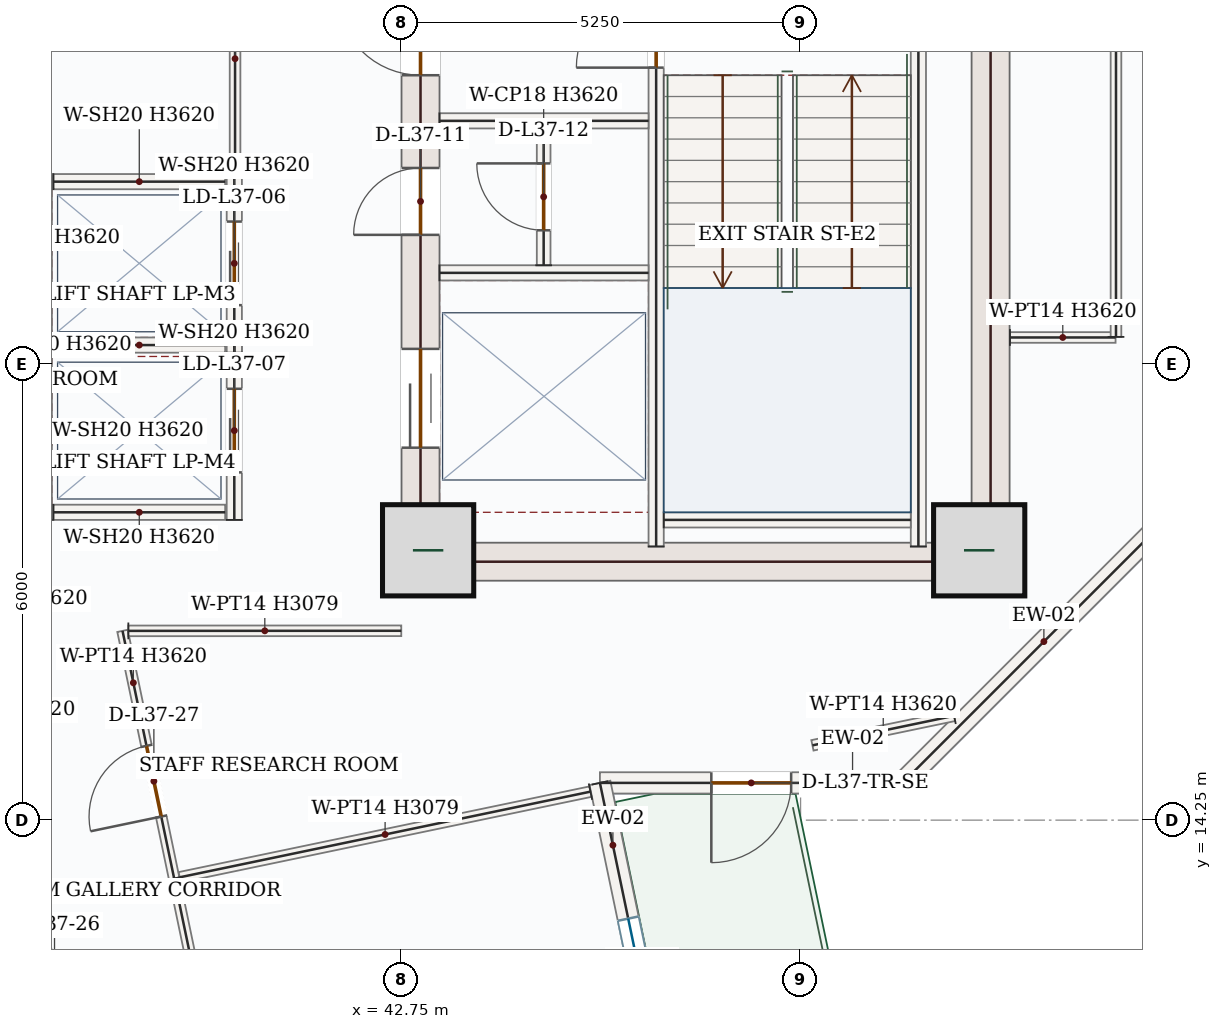
"""IFC4 building model, lengths in metres.
Left out: names, types, materials, properties, quantities, classifications, styles, units other than length and angle.
Written with IfcOpenShell. Run it as: python <this file> out.ifc"""

import sys

from ifc_helpers import new_model, si_unit, direction, frame, frame_2d, origin, origin_2d, place, context, subcontext, project, spatial, rectangle, extrude, source, transform, mapped, element, fill, save


model = new_model("IFC4")
c1 = context("Model", 3, precision=1e-05, world=origin(), true_north=direction((0.0, 1.0)))
c2 = subcontext(c1, "Body", "Model", "MODEL_VIEW")
j1 = project(units=[si_unit("LENGTHUNIT", "METRE"), si_unit("PLANEANGLEUNIT", "RADIAN")], contexts=[c1])
p1 = place(None, origin())
s1 = spatial("IfcSite", under=j1, at=p1, CompositionType="ELEMENT")
p2 = place(p1, origin())
s2 = spatial("IfcBuilding", under=s1, at=p2, CompositionType="ELEMENT")
p3 = place(p2, frame((0.0, 0.0, 162.9)))
s3 = spatial("IfcBuildingStorey", under=s2, at=p3, CompositionType="ELEMENT", Elevation=162.9)
p4 = place(p3, frame((43.0, 17.4, 0.0), z_axis=(0.0, 0.0, 1.0), x_axis=(0.0, 1.0, 0.0)))
e1 = element("IfcWall", 1, at=p4, inside=s3, PredefinedType="SHEAR", context=c2, shape_type="SweptSolid", body=[
    extrude(rectangle(XDim=8.55, YDim=0.5, at=frame_2d((4.275, 0.0))), origin(), (0.0, 0.0, 1.0), 3.62),
])
p5 = place(p4, frame((6.65, 0.0, 0.0)))
e2 = element("IfcOpeningElement", 2, at=p5, cuts=e1, PredefinedType="OPENING", context=c2, shape_type="SweptSolid", body=[
    extrude(rectangle(XDim=1.1, YDim=2.2, at=frame_2d((0.55, 1.1))), frame((0.0, 0.26, 0.0), z_axis=(0.0, -1.0, 0.0), x_axis=(1.0, 0.0, 0.0)), (0.0, 0.0, 1.0), 0.52),
])
p6 = place(p4, frame((1.75, 0.0, 0.0)))
e3 = element("IfcOpeningElement", 3, at=p6, cuts=e1, PredefinedType="OPENING", context=c2, shape_type="SweptSolid", body=[
    extrude(rectangle(XDim=1.3, YDim=2.2, at=frame_2d((0.65, 1.1))), frame((0.0, 0.26, 0.0), z_axis=(0.0, -1.0, 0.0), x_axis=(1.0, 0.0, 0.0)), (0.0, 0.0, 1.0), 0.52),
])
p7 = place(p4, frame((4.55, 0.0, 0.0)))
e4 = element("IfcOpeningElement", 4, at=p7, cuts=e1, PredefinedType="OPENING", context=c2, shape_type="SweptSolid", body=[
    extrude(rectangle(XDim=0.88, YDim=2.1, at=frame_2d((0.44, 1.05))), frame((0.0, 0.26, 0.0), z_axis=(0.0, -1.0, 0.0), x_axis=(1.0, 0.0, 0.0)), (0.0, 0.0, 1.0), 0.52),
])
m1 = source(origin(), c2, "Body", "SweptSolid", [
    extrude(rectangle(XDim=8.55, YDim=0.5, at=frame_2d((4.275, 0.0))), origin(), (0.0, 0.0, 1.0), 3.62),
])
p8 = place(p3, frame((50.5, 17.4, 0.0), z_axis=(0.0, 0.0, 1.0), x_axis=(0.0, 1.0, 0.0)))
e5 = element("IfcWall", 5, at=p8, inside=s3, PredefinedType="SHEAR", context=c2, shape_type="MappedRepresentation", body=[
    mapped(m1, transform((0.0, 0.0, 0.0), x_axis=(1.0, 0.0, 0.0), y_axis=(0.0, 1.0, 0.0), z_axis=(0.0, 0.0, 1.0), scale=1.0)),
])
m2 = source(origin(), c2, "Body", "SweptSolid", [
    extrude(rectangle(XDim=7.0, YDim=0.5, at=frame_2d((3.5, 0.0))), origin(), (0.0, 0.0, 1.0), 3.62),
])
p9 = place(p3, frame((43.25, 17.65, 0.0), z_axis=(0.0, 0.0, 1.0), x_axis=(1.0, 0.0, 0.0)))
e6 = element("IfcWall", 6, at=p9, inside=s3, PredefinedType="SHEAR", context=c2, shape_type="MappedRepresentation", body=[
    mapped(m2, transform((0.0, 0.0, 0.0), x_axis=(1.0, 0.0, 0.0), y_axis=(0.0, 1.0, 0.0), z_axis=(0.0, 0.0, 1.0), scale=1.0)),
])
m3 = source(origin(), c2, "Body", "SweptSolid", [
    extrude(rectangle(XDim=1.2, YDim=1.2, at=origin_2d()), origin(), (0.0, 0.0, 1.0), 3.9),
])
for number, where, z_axis, x_axis in (
    (7, (43.1, 17.8, 0.0), (0.0, 0.0, 1.0), (1.0, 0.0, 0.0)),
    (8, (50.35, 17.8, 0.0), (0.0, 0.0, 1.0), (1.0, 0.0, 0.0)),
):
    element("IfcColumn", number, at=place(p3, frame(where, z_axis=z_axis, x_axis=x_axis)), inside=s3, PredefinedType="COLUMN", context=c2, shape_type="MappedRepresentation", body=[
        mapped(m3, transform((0.0, 0.0, 0.0), x_axis=(1.0, 0.0, 0.0), y_axis=(0.0, 1.0, 0.0), z_axis=(0.0, 0.0, 1.0), scale=1.0)),
    ])
m4 = source(origin(), c2, "Body", "SweptSolid", [
    extrude(rectangle(XDim=5.258, YDim=0.28, at=frame_2d((2.629, 0.0))), origin(), (0.0, 0.0, 1.0), 3.62),
])
p10 = place(p3, frame((53.06, 18.458, 0.0), z_axis=(0.0, 0.0, 1.0), x_axis=(-0.707106781187, -0.707106781187, 0.0)))
e9 = element("IfcWall", 9, at=p10, inside=s3, PredefinedType="SOLIDWALL", context=c2, shape_type="MappedRepresentation", body=[
    mapped(m4, transform((0.0, 0.0, 0.0), x_axis=(1.0, 0.0, 0.0), y_axis=(0.0, 1.0, 0.0), z_axis=(0.0, 0.0, 1.0), scale=1.0)),
])
p11 = place(p3, frame((49.342, 14.74, 0.0), z_axis=(0.0, 0.0, 1.0), x_axis=(-1.0, 0.0, 0.0)))
e10 = element("IfcWall", 10, at=p11, inside=s3, PredefinedType="SOLIDWALL", context=c2, shape_type="SweptSolid", body=[
    extrude(rectangle(XDim=3.982, YDim=0.28, at=frame_2d((1.991, 0.0))), origin(), (0.0, 0.0, 1.0), 3.62),
])
p12 = place(p11, frame((1.466, 0.0, 0.0)))
e11 = element("IfcOpeningElement", 11, at=p12, cuts=e10, PredefinedType="OPENING", context=c2, shape_type="SweptSolid", body=[
    extrude(rectangle(XDim=1.05, YDim=2.15, at=frame_2d((0.525, 1.075))), frame((0.0, 0.15, 0.0), z_axis=(0.0, -1.0, 0.0), x_axis=(1.0, 0.0, 0.0)), (0.0, 0.0, 1.0), 0.3),
])
p13 = place(p3, frame((45.36, 14.74, 0.0), z_axis=(0.0, 0.0, 1.0), x_axis=(0.204151126022, -0.978939384101, 0.0)))
e12 = element("IfcWall", 12, at=p13, inside=s3, PredefinedType="SOLIDWALL", context=c2, shape_type="SweptSolid", body=[
    extrude(rectangle(XDim=5.447, YDim=0.28, at=frame_2d((2.724, 0.0))), origin(), (0.0, 0.0, 1.0), 3.62),
])
p14 = place(p13, frame((1.824, 0.0, 0.85)))
e13 = element("IfcOpeningElement", 13, at=p14, cuts=e12, PredefinedType="OPENING", context=c2, shape_type="SweptSolid", body=[
    extrude(rectangle(XDim=1.8, YDim=1.75, at=frame_2d((0.9, 0.875))), frame((0.0, 0.15, 0.0), z_axis=(0.0, -1.0, 0.0), x_axis=(1.0, 0.0, 0.0)), (0.0, 0.0, 1.0), 0.3),
])
m5 = source(origin(), c2, "Body", "SweptSolid", [
    extrude(rectangle(XDim=7.87, YDim=0.2, at=frame_2d((3.935, 0.0))), origin(), (0.0, 0.0, 1.0), 3.62),
])
p15 = place(p3, frame((49.55, 17.85, 0.0), z_axis=(0.0, 0.0, 1.0), x_axis=(0.0, 1.0, 0.0)))
e14 = element("IfcWall", 14, at=p15, inside=s3, PredefinedType="SOLIDWALL", context=c2, shape_type="MappedRepresentation", body=[
    mapped(m5, transform((0.0, 0.0, 0.0), x_axis=(1.0, 0.0, 0.0), y_axis=(0.0, 1.0, 0.0), z_axis=(0.0, 0.0, 1.0), scale=1.0)),
])
p16 = place(p3, frame((46.1, 17.85, 0.0), z_axis=(0.0, 0.0, 1.0), x_axis=(0.0, 1.0, 0.0)))
e15 = element("IfcWall", 15, at=p16, inside=s3, PredefinedType="SOLIDWALL", context=c2, shape_type="SweptSolid", body=[
    extrude(rectangle(XDim=8.0, YDim=0.2, at=frame_2d((4.0, 0.0))), origin(), (0.0, 0.0, 1.0), 3.62),
])
p17 = place(p16, frame((6.3, 0.0, 0.0)))
e16 = element("IfcOpeningElement", 16, at=p17, cuts=e15, PredefinedType="OPENING", context=c2, shape_type="SweptSolid", body=[
    extrude(rectangle(XDim=1.05, YDim=2.15, at=frame_2d((0.525, 1.075))), frame((0.0, 0.11, 0.0), z_axis=(0.0, -1.0, 0.0), x_axis=(1.0, 0.0, 0.0)), (0.0, 0.0, 1.0), 0.22),
])
m6 = source(origin(), c2, "Body", "SweptSolid", [
    extrude(rectangle(XDim=3.25, YDim=0.2, at=frame_2d((1.625, 0.0))), origin(), (0.0, 0.0, 1.0), 3.62),
])
p18 = place(p3, frame((46.2, 18.2, 0.0), z_axis=(0.0, 0.0, 1.0), x_axis=(1.0, 0.0, 0.0)))
e17 = element("IfcWall", 17, at=p18, inside=s3, PredefinedType="SOLIDWALL", context=c2, shape_type="MappedRepresentation", body=[
    mapped(m6, transform((0.0, 0.0, 0.0), x_axis=(1.0, 0.0, 0.0), y_axis=(0.0, 1.0, 0.0), z_axis=(0.0, 0.0, 1.0), scale=1.0)),
])
m7 = source(origin(), c2, "Body", "SweptSolid", [
    extrude(rectangle(XDim=2.75, YDim=0.2, at=frame_2d((1.375, 0.0))), origin(), (0.0, 0.0, 1.0), 3.62),
])
for number, where, z_axis, x_axis in (
    (18, (43.25, 23.45, 0.0), (0.0, 0.0, 1.0), (1.0, 0.0, 0.0)),
    (19, (43.25, 21.45, 0.0), (0.0, 0.0, 1.0), (1.0, 0.0, 0.0)),
):
    element("IfcWall", number, at=place(p3, frame(where, z_axis=z_axis, x_axis=x_axis)), inside=s3, PredefinedType="SOLIDWALL", context=c2, shape_type="MappedRepresentation", body=[
        mapped(m7, transform((0.0, 0.0, 0.0), x_axis=(1.0, 0.0, 0.0), y_axis=(0.0, 1.0, 0.0), z_axis=(0.0, 0.0, 1.0), scale=1.0)),
    ])
p19 = place(p3, frame((44.62, 21.55, 0.0), z_axis=(0.0, 0.0, 1.0), x_axis=(0.0, 1.0, 0.0)))
e20 = element("IfcWall", 20, at=p19, inside=s3, PredefinedType="PARTITIONING", context=c2, shape_type="SweptSolid", body=[
    extrude(rectangle(XDim=1.8, YDim=0.18, at=frame_2d((0.9, 0.0))), origin(), (0.0, 0.0, 1.0), 3.62),
])
p20 = place(p19, frame((0.46, 0.0, 0.0)))
e21 = element("IfcOpeningElement", 21, at=p20, cuts=e20, PredefinedType="OPENING", context=c2, shape_type="SweptSolid", body=[
    extrude(rectangle(XDim=0.88, YDim=2.1, at=frame_2d((0.44, 1.05))), frame((0.0, 0.1, 0.0), z_axis=(0.0, -1.0, 0.0), x_axis=(1.0, 0.0, 0.0)), (0.0, 0.0, 1.0), 0.2),
])
p21 = place(p3, frame((40.55, 20.4, 0.0), z_axis=(0.0, 0.0, 1.0), x_axis=(0.0, 1.0, 0.0)))
e22 = element("IfcWall", 22, at=p21, inside=s3, PredefinedType="SOLIDWALL", context=c2, shape_type="SweptSolid", body=[
    extrude(rectangle(XDim=2.35, YDim=0.2, at=frame_2d((1.175, 0.0))), origin(), (0.0, 0.0, 1.0), 3.62),
])
p22 = place(p21, frame((0.625, 0.0, 0.0)))
e23 = element("IfcOpeningElement", 23, at=p22, cuts=e22, PredefinedType="OPENING", context=c2, shape_type="SweptSolid", body=[
    extrude(rectangle(XDim=1.1, YDim=2.15, at=frame_2d((0.55, 1.075))), frame((0.0, 0.11, 0.0), z_axis=(0.0, -1.0, 0.0), x_axis=(1.0, 0.0, 0.0)), (0.0, 0.0, 1.0), 0.22),
])
m8 = source(origin(), c2, "Body", "SweptSolid", [
    extrude(rectangle(XDim=2.26, YDim=0.2, at=frame_2d((1.13, 0.0))), origin(), (0.0, 0.0, 1.0), 3.62),
])
for number, where, z_axis, x_axis in (
    (24, (38.17, 20.5, 0.0), (0.0, 0.0, 1.0), (1.0, 0.0, 0.0)),
    (25, (38.17, 22.65, 0.0), (0.0, 0.0, 1.0), (1.0, 0.0, 0.0)),
):
    element("IfcWall", number, at=place(p3, frame(where, z_axis=z_axis, x_axis=x_axis)), inside=s3, PredefinedType="SOLIDWALL", context=c2, shape_type="MappedRepresentation", body=[
        mapped(m8, transform((0.0, 0.0, 0.0), x_axis=(1.0, 0.0, 0.0), y_axis=(0.0, 1.0, 0.0), z_axis=(0.0, 0.0, 1.0), scale=1.0)),
    ])
p23 = place(p3, frame((40.55, 18.2, 0.0), z_axis=(0.0, 0.0, 1.0), x_axis=(0.0, 1.0, 0.0)))
e26 = element("IfcWall", 26, at=p23, inside=s3, PredefinedType="SOLIDWALL", context=c2, shape_type="SweptSolid", body=[
    extrude(rectangle(XDim=2.35, YDim=0.2, at=frame_2d((1.175, 0.0))), origin(), (0.0, 0.0, 1.0), 3.62),
])
p24 = place(p23, frame((0.625, 0.0, 0.0)))
e27 = element("IfcOpeningElement", 27, at=p24, cuts=e26, PredefinedType="OPENING", context=c2, shape_type="SweptSolid", body=[
    extrude(rectangle(XDim=1.1, YDim=2.15, at=frame_2d((0.55, 1.075))), frame((0.0, 0.11, 0.0), z_axis=(0.0, -1.0, 0.0), x_axis=(1.0, 0.0, 0.0)), (0.0, 0.0, 1.0), 0.22),
])
p25 = place(p3, frame((38.17, 18.3, 0.0), z_axis=(0.0, 0.0, 1.0), x_axis=(1.0, 0.0, 0.0)))
e28 = element("IfcWall", 28, at=p25, inside=s3, PredefinedType="SOLIDWALL", context=c2, shape_type="MappedRepresentation", body=[
    mapped(m8, transform((0.0, 0.0, 0.0), x_axis=(1.0, 0.0, 0.0), y_axis=(0.0, 1.0, 0.0), z_axis=(0.0, 0.0, 1.0), scale=1.0)),
])
m9 = source(origin(), c2, "Body", "SweptSolid", [
    extrude(rectangle(XDim=3.035, YDim=0.14, at=frame_2d((1.518, 0.0))), origin(), (0.0, 0.0, 1.0), 3.62),
])
p26 = place(p3, frame((40.56, 25.785, 0.0), z_axis=(0.0, 0.0, 1.0), x_axis=(0.0, -1.0, 0.0)))
e29 = element("IfcWall", 29, at=p26, inside=s3, PredefinedType="PARTITIONING", context=c2, shape_type="MappedRepresentation", body=[
    mapped(m9, transform((0.0, 0.0, 0.0), x_axis=(1.0, 0.0, 0.0), y_axis=(0.0, 1.0, 0.0), z_axis=(0.0, 0.0, 1.0), scale=1.0)),
])
p27 = place(p3, frame((39.759, 13.483, 0.0), z_axis=(0.0, 0.0, 1.0), x_axis=(-0.204124193585, 0.97894500029, 0.0)))
e30 = element("IfcWall", 30, at=p27, inside=s3, PredefinedType="PARTITIONING", context=c2, shape_type="SweptSolid", body=[
    extrude(rectangle(XDim=3.327, YDim=0.14, at=frame_2d((1.664, 0.0))), origin(), (0.0, 0.0, 1.0), 3.62),
])
p28 = place(p27, frame((0.832, 0.0, 0.0)))
e31 = element("IfcOpeningElement", 31, at=p28, cuts=e30, PredefinedType="OPENING", context=c2, shape_type="SweptSolid", body=[
    extrude(rectangle(XDim=0.95, YDim=2.15, at=frame_2d((0.475, 1.075))), frame((0.0, 0.08, 0.0), z_axis=(0.0, -1.0, 0.0), x_axis=(1.0, 0.0, 0.0)), (0.0, 0.0, 1.0), 0.16),
])
m10 = source(origin(), c2, "Body", "SweptSolid", [
    extrude(rectangle(XDim=3.591, YDim=0.14, at=frame_2d((1.795, 0.0))), origin(), (0.0, 0.0, 1.0), 3.079),
])
p29 = place(p3, frame((39.156, 16.74, 0.0), z_axis=(0.0, 0.0, 1.0), x_axis=(0.999999942209, 0.000339974142, 0.0)))
e32 = element("IfcWall", 32, at=p29, inside=s3, PredefinedType="PARTITIONING", context=c2, shape_type="MappedRepresentation", body=[
    mapped(m10, transform((0.0, 0.0, 0.0), x_axis=(1.0, 0.0, 0.0), y_axis=(0.0, 1.0, 0.0), z_axis=(0.0, 0.0, 1.0), scale=1.0)),
])
m11 = source(origin(), c2, "Body", "SweptSolid", [
    extrude(rectangle(XDim=1.903, YDim=0.14, at=frame_2d((0.952, 0.0))), origin(), (0.0, 0.0, 1.0), 3.62),
])
p30 = place(p3, frame((50.019, 15.623, 0.0), z_axis=(0.0, 0.0, 1.0), x_axis=(-0.978929167673, -0.204200109399, 0.0)))
e33 = element("IfcWall", 33, at=p30, inside=s3, PredefinedType="PARTITIONING", context=c2, shape_type="MappedRepresentation", body=[
    mapped(m11, transform((0.0, 0.0, 0.0), x_axis=(1.0, 0.0, 0.0), y_axis=(0.0, 1.0, 0.0), z_axis=(0.0, 0.0, 1.0), scale=1.0)),
])
m12 = source(origin(), c2, "Body", "SweptSolid", [
    extrude(rectangle(XDim=5.52, YDim=0.14, at=frame_2d((2.76, 0.0))), origin(), (0.0, 0.0, 1.0), 3.079),
])
p31 = place(p3, frame((45.236, 14.625, 0.0), z_axis=(0.0, 0.0, 1.0), x_axis=(-0.97893845252, -0.204155593062, 0.0)))
e34 = element("IfcWall", 34, at=p31, inside=s3, PredefinedType="PARTITIONING", context=c2, shape_type="MappedRepresentation", body=[
    mapped(m12, transform((0.0, 0.0, 0.0), x_axis=(1.0, 0.0, 0.0), y_axis=(0.0, 1.0, 0.0), z_axis=(0.0, 0.0, 1.0), scale=1.0)),
])
p32 = place(p3, frame((41.182, 6.657, 0.0), z_axis=(0.0, 0.0, 1.0), x_axis=(-0.204158980406, 0.97893774609, 0.0)))
e35 = element("IfcWall", 35, at=p32, inside=s3, PredefinedType="PARTITIONING", context=c2, shape_type="SweptSolid", body=[
    extrude(rectangle(XDim=6.953, YDim=0.14, at=frame_2d((3.476, 0.0))), origin(), (0.0, 0.0, 1.0), 3.62),
])
p33 = place(p32, frame((3.001, 0.0, 0.0)))
e36 = element("IfcOpeningElement", 36, at=p33, cuts=e35, PredefinedType="OPENING", context=c2, shape_type="SweptSolid", body=[
    extrude(rectangle(XDim=0.95, YDim=2.15, at=frame_2d((0.475, 1.075))), frame((0.0, 0.08, 0.0), z_axis=(0.0, -1.0, 0.0), x_axis=(1.0, 0.0, 0.0)), (0.0, 0.0, 1.0), 0.16),
])
p34 = place(p3, frame((37.778, 13.969, 0.0), z_axis=(0.0, 0.0, 1.0), x_axis=(0.204175249208, -0.978934353065, 0.0)))
e37 = element("IfcWall", 37, at=p34, inside=s3, PredefinedType="PARTITIONING", context=c2, shape_type="SweptSolid", body=[
    extrude(rectangle(XDim=7.853, YDim=0.14, at=frame_2d((3.926, 0.0))), origin(), (0.0, 0.0, 1.0), 3.62),
])
p35 = place(p34, frame((1.519, 0.0, 0.0)))
e38 = element("IfcOpeningElement", 38, at=p35, cuts=e37, PredefinedType="OPENING", context=c2, shape_type="SweptSolid", body=[
    extrude(rectangle(XDim=0.95, YDim=2.15, at=frame_2d((0.475, 1.075))), frame((0.0, 0.08, 0.0), z_axis=(0.0, -1.0, 0.0), x_axis=(1.0, 0.0, 0.0)), (0.0, 0.0, 1.0), 0.16),
])
m13 = source(origin(), c2, "Body", "SweptSolid", [
    extrude(rectangle(XDim=1.389, YDim=0.14, at=frame_2d((0.695, 0.0))), origin(), (0.0, 0.0, 1.0), 3.62),
])
p36 = place(p3, frame((50.755, 20.6, 0.0), z_axis=(0.0, 0.0, 1.0), x_axis=(1.0, 0.0, 0.0)))
e39 = element("IfcWall", 39, at=p36, inside=s3, PredefinedType="PARTITIONING", context=c2, shape_type="MappedRepresentation", body=[
    mapped(m13, transform((0.0, 0.0, 0.0), x_axis=(1.0, 0.0, 0.0), y_axis=(0.0, 1.0, 0.0), z_axis=(0.0, 0.0, 1.0), scale=1.0)),
])
m14 = source(origin(), c2, "Body", "SweptSolid", [
    extrude(rectangle(XDim=8.821, YDim=0.14, at=frame_2d((4.41, 0.0))), origin(), (0.0, 0.0, 1.0), 2.693),
])
p37 = place(p3, frame((52.15, 20.608, 0.0), z_axis=(0.0, 0.0, 1.0), x_axis=(2.7678596e-05, 0.999999999617, 0.0)))
e40 = element("IfcWall", 40, at=p37, inside=s3, PredefinedType="PARTITIONING", context=c2, shape_type="MappedRepresentation", body=[
    mapped(m14, transform((0.0, 0.0, 0.0), x_axis=(1.0, 0.0, 0.0), y_axis=(0.0, 1.0, 0.0), z_axis=(0.0, 0.0, 1.0), scale=1.0)),
])
m15 = source(origin(), c2, "Body", "SweptSolid", [
    extrude(rectangle(XDim=1.05, YDim=2.15, at=frame_2d((0.525, 1.075))), frame((0.0, 0.025, 0.0), z_axis=(0.0, -1.0, 0.0), x_axis=(1.0, 0.0, 0.0)), (0.0, 0.0, 1.0), 0.05),
])
p38 = place(p12, origin())
e41 = element("IfcDoor", 41, at=p38, inside=s3, OperationType="SINGLE_SWING_RIGHT", PredefinedType="DOOR", context=c2, shape_type="MappedRepresentation", body=[
    mapped(m15, transform((0.0, 0.0, 0.0), x_axis=(1.0, 0.0, 0.0), y_axis=(0.0, 1.0, 0.0), z_axis=(0.0, 0.0, 1.0), scale=1.0)),
])
fill(e11, e41)
m16 = source(origin(), c2, "Body", "SweptSolid", [
    extrude(rectangle(XDim=1.8, YDim=1.75, at=frame_2d((0.9, 0.875))), frame((0.0, 0.03, 0.0), z_axis=(0.0, -1.0, 0.0), x_axis=(1.0, 0.0, 0.0)), (0.0, 0.0, 1.0), 0.06),
])
p39 = place(p14, origin())
e42 = element("IfcWindow", 42, at=p39, inside=s3, PartitioningType="DOUBLE_PANEL_VERTICAL", PredefinedType="WINDOW", context=c2, shape_type="MappedRepresentation", body=[
    mapped(m16, transform((0.0, 0.0, 0.0), x_axis=(1.0, 0.0, 0.0), y_axis=(0.0, 1.0, 0.0), z_axis=(0.0, 0.0, 1.0), scale=1.0)),
])
fill(e13, e42)
p40 = place(p17, origin())
e43 = element("IfcDoor", 43, at=p40, inside=s3, OperationType="SINGLE_SWING_LEFT", PredefinedType="DOOR", context=c2, shape_type="MappedRepresentation", body=[
    mapped(m15, transform((0.0, 0.0, 0.0), x_axis=(1.0, 0.0, 0.0), y_axis=(0.0, 1.0, 0.0), z_axis=(0.0, 0.0, 1.0), scale=1.0)),
])
fill(e16, e43)
m17 = source(origin(), c2, "Body", "SweptSolid", [
    extrude(rectangle(XDim=1.1, YDim=2.2, at=frame_2d((0.55, 1.1))), frame((0.0, 0.025, 0.0), z_axis=(0.0, -1.0, 0.0), x_axis=(1.0, 0.0, 0.0)), (0.0, 0.0, 1.0), 0.05),
])
p41 = place(p5, origin())
e44 = element("IfcDoor", 44, at=p41, inside=s3, OperationType="SINGLE_SWING_RIGHT", PredefinedType="DOOR", context=c2, shape_type="MappedRepresentation", body=[
    mapped(m17, transform((0.0, 0.0, 0.0), x_axis=(1.0, 0.0, 0.0), y_axis=(0.0, 1.0, 0.0), z_axis=(0.0, 0.0, 1.0), scale=1.0)),
])
fill(e2, e44)
m18 = source(origin(), c2, "Body", "SweptSolid", [
    extrude(rectangle(XDim=1.3, YDim=2.2, at=frame_2d((0.65, 1.1))), frame((0.0, 0.025, 0.0), z_axis=(0.0, -1.0, 0.0), x_axis=(1.0, 0.0, 0.0)), (0.0, 0.0, 1.0), 0.05),
])
p42 = place(p6, origin())
e45 = element("IfcDoor", 45, at=p42, inside=s3, OperationType="DOUBLE_DOOR_SLIDING", PredefinedType="DOOR", context=c2, shape_type="MappedRepresentation", body=[
    mapped(m18, transform((0.0, 0.0, 0.0), x_axis=(1.0, 0.0, 0.0), y_axis=(0.0, 1.0, 0.0), z_axis=(0.0, 0.0, 1.0), scale=1.0)),
])
fill(e3, e45)
m19 = source(origin(), c2, "Body", "SweptSolid", [
    extrude(rectangle(XDim=0.88, YDim=2.1, at=frame_2d((0.44, 1.05))), frame((0.0, 0.025, 0.0), z_axis=(0.0, -1.0, 0.0), x_axis=(1.0, 0.0, 0.0)), (0.0, 0.0, 1.0), 0.05),
])
p43 = place(p7, origin())
e46 = element("IfcDoor", 46, at=p43, inside=s3, OperationType="SINGLE_SWING_LEFT", PredefinedType="DOOR", context=c2, shape_type="MappedRepresentation", body=[
    mapped(m19, transform((0.0, 0.0, 0.0), x_axis=(1.0, 0.0, 0.0), y_axis=(0.0, 1.0, 0.0), z_axis=(0.0, 0.0, 1.0), scale=1.0)),
])
fill(e4, e46)
p44 = place(p20, origin())
e47 = element("IfcDoor", 47, at=p44, inside=s3, OperationType="SINGLE_SWING_RIGHT", PredefinedType="DOOR", context=c2, shape_type="MappedRepresentation", body=[
    mapped(m19, transform((0.0, 0.0, 0.0), x_axis=(1.0, 0.0, 0.0), y_axis=(0.0, 1.0, 0.0), z_axis=(0.0, 0.0, 1.0), scale=1.0)),
])
fill(e21, e47)
m20 = source(origin(), c2, "Body", "SweptSolid", [
    extrude(rectangle(XDim=1.1, YDim=2.15, at=frame_2d((0.55, 1.075))), frame((0.0, 0.025, 0.0), z_axis=(0.0, -1.0, 0.0), x_axis=(1.0, 0.0, 0.0)), (0.0, 0.0, 1.0), 0.05),
])
p45 = place(p22, origin())
e48 = element("IfcDoor", 48, at=p45, inside=s3, OperationType="DOUBLE_DOOR_SLIDING", PredefinedType="DOOR", context=c2, shape_type="MappedRepresentation", body=[
    mapped(m20, transform((0.0, 0.0, 0.0), x_axis=(1.0, 0.0, 0.0), y_axis=(0.0, 1.0, 0.0), z_axis=(0.0, 0.0, 1.0), scale=1.0)),
])
fill(e23, e48)
p46 = place(p24, origin())
e49 = element("IfcDoor", 49, at=p46, inside=s3, OperationType="DOUBLE_DOOR_SLIDING", PredefinedType="DOOR", context=c2, shape_type="MappedRepresentation", body=[
    mapped(m20, transform((0.0, 0.0, 0.0), x_axis=(1.0, 0.0, 0.0), y_axis=(0.0, 1.0, 0.0), z_axis=(0.0, 0.0, 1.0), scale=1.0)),
])
fill(e27, e49)
m21 = source(origin(), c2, "Body", "SweptSolid", [
    extrude(rectangle(XDim=0.95, YDim=2.15, at=frame_2d((0.475, 1.075))), frame((0.0, 0.025, 0.0), z_axis=(0.0, -1.0, 0.0), x_axis=(1.0, 0.0, 0.0)), (0.0, 0.0, 1.0), 0.05),
])
p47 = place(p28, origin())
e50 = element("IfcDoor", 50, at=p47, inside=s3, OperationType="SINGLE_SWING_LEFT", PredefinedType="DOOR", context=c2, shape_type="MappedRepresentation", body=[
    mapped(m21, transform((0.0, 0.0, 0.0), x_axis=(1.0, 0.0, 0.0), y_axis=(0.0, 1.0, 0.0), z_axis=(0.0, 0.0, 1.0), scale=1.0)),
])
fill(e31, e50)
save(model, sys.argv[1])
